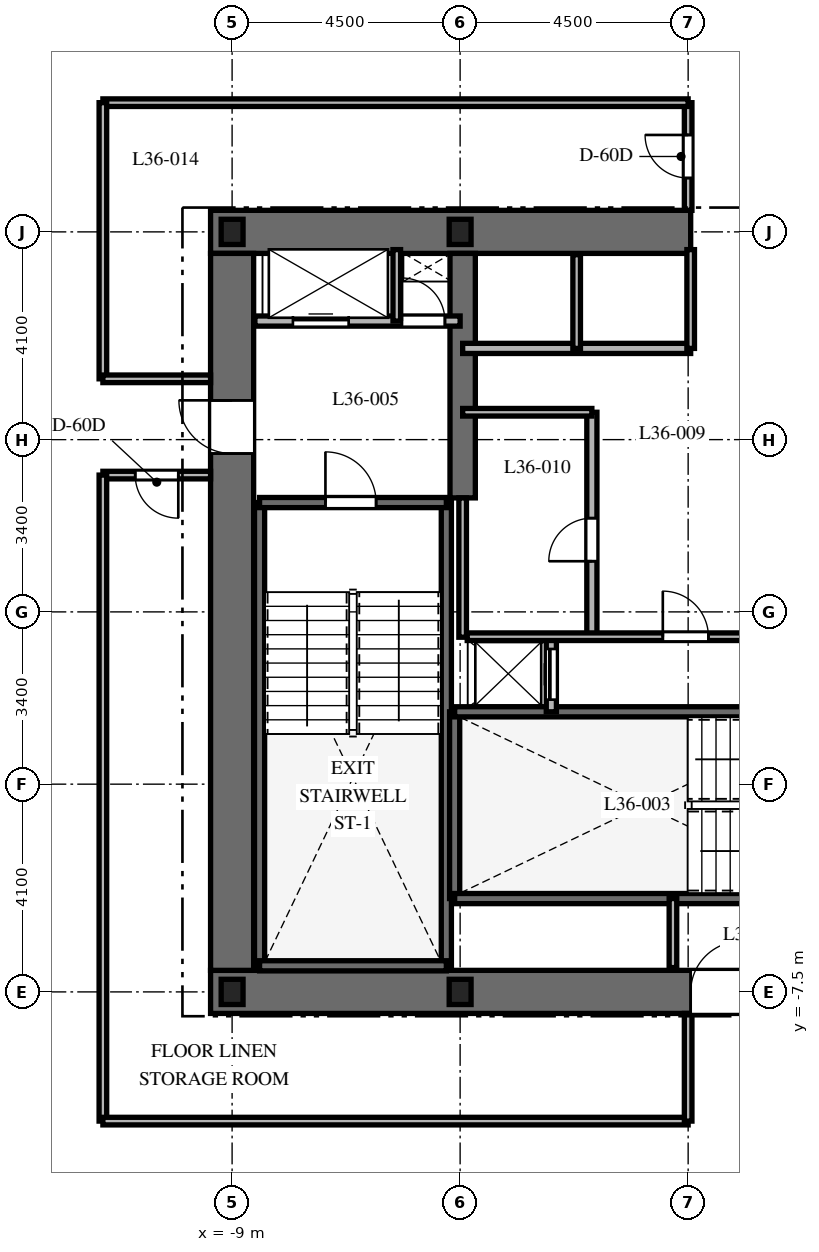
"""IFC4 building model, lengths in metres.
Left out: names, types, materials, properties, quantities, classifications, styles, units other than length and angle.
Written with IfcOpenShell. Run it as: python <this file> out.ifc"""

import sys

from ifc_helpers import new_model, si_unit, direction, frame, frame_2d, origin, origin_2d, place, context, subcontext, project, spatial, rectangle, i_section, extrude, element, fill, save


model = new_model("IFC4")
c1 = context("Model", 3, precision=1e-05, world=origin(), true_north=direction((0.0, 1.0)))
c2 = subcontext(c1, "Body", "Model", "MODEL_VIEW")
j1 = project(units=[si_unit("LENGTHUNIT", "METRE"), si_unit("PLANEANGLEUNIT", "RADIAN")], contexts=[c1])
p1 = place(None, origin())
s1 = spatial("IfcSite", under=j1, at=p1, CompositionType="ELEMENT")
p2 = place(p1, origin())
s2 = spatial("IfcBuilding", under=s1, at=p2, CompositionType="ELEMENT")
p3 = place(p2, frame((0.0, 0.0, 148.0)))
s3 = spatial("IfcBuildingStorey", under=s2, at=p3, CompositionType="ELEMENT", Elevation=148.0)
p4 = place(p3, frame((-9.425, -7.5, 0.0), z_axis=(0.0, 0.0, 1.0), x_axis=(1.0, 0.0, 0.0)))
e1 = element("IfcWall", 1, at=p4, inside=s3, PredefinedType="SHEAR", context=c2, shape_type="SweptSolid", body=[
    extrude(rectangle(XDim=18.85, YDim=0.85, at=frame_2d((9.425, 0.0))), origin(), (0.0, 0.0, 1.0), 3.7),
])
p5 = place(p4, frame((9.475, 0.0, 0.0)))
e2 = element("IfcOpeningElement", 2, at=p5, cuts=e1, PredefinedType="OPENING", context=c2, shape_type="SweptSolid", body=[
    extrude(rectangle(XDim=1.0, YDim=2.15, at=frame_2d((0.5, 1.075))), frame((0.0, 0.435, 0.0), z_axis=(0.0, -1.0, 0.0), x_axis=(1.0, 0.0, 0.0)), (0.0, 0.0, 1.0), 0.87),
])
p6 = place(p3, frame((-9.425, 7.5, 0.0), z_axis=(0.0, 0.0, 1.0), x_axis=(1.0, 0.0, 0.0)))
e3 = element("IfcWall", 3, at=p6, inside=s3, PredefinedType="SHEAR", context=c2, shape_type="SweptSolid", body=[
    extrude(rectangle(XDim=9.475, YDim=0.85, at=frame_2d((4.738, 0.0))), origin(), (0.0, 0.0, 1.0), 3.7),
])
p7 = place(p3, frame((-9.0, -7.075, 0.0), z_axis=(0.0, 0.0, 1.0), x_axis=(0.0, 1.0, 0.0)))
e4 = element("IfcWall", 4, at=p7, inside=s3, PredefinedType="SHEAR", context=c2, shape_type="SweptSolid", body=[
    extrude(rectangle(XDim=14.15, YDim=0.85, at=frame_2d((7.075, 0.0))), origin(), (0.0, 0.0, 1.0), 3.7),
])
p8 = place(p7, frame((10.2, 0.0, 0.0)))
e5 = element("IfcOpeningElement", 5, at=p8, cuts=e4, PredefinedType="OPENING", context=c2, shape_type="SweptSolid", body=[
    extrude(rectangle(XDim=1.05, YDim=2.15, at=frame_2d((0.525, 1.075))), frame((0.0, 0.435, 0.0), z_axis=(0.0, -1.0, 0.0), x_axis=(1.0, 0.0, 0.0)), (0.0, 0.0, 1.0), 0.87),
])
p9 = place(p3, frame((-4.45, 2.25, 0.0), z_axis=(0.0, 0.0, 1.0), x_axis=(0.0, 1.0, 0.0)))
e6 = element("IfcWall", 6, at=p9, inside=s3, PredefinedType="SHEAR", context=c2, shape_type="SweptSolid", body=[
    extrude(rectangle(XDim=4.825, YDim=0.5, at=frame_2d((2.413, 0.0))), origin(), (0.0, 0.0, 1.0), 3.7),
])
for number, where, z_axis, x_axis in (
    (7, (-8.458, -6.985, 0.0), (0.0, 0.0, 1.0), (0.0, 1.0, 0.0)),
    (8, (-4.772, -6.985, 0.0), (0.0, 0.0, 1.0), (0.0, 1.0, 0.0)),
):
    element("IfcWall", number, at=place(p3, frame(where, z_axis=z_axis, x_axis=x_axis)), inside=s3, PredefinedType="SHEAR", context=c2, shape_type="SweptSolid", body=[
        extrude(rectangle(XDim=9.143, YDim=0.2, at=frame_2d((4.572, 0.0))), origin(), (0.0, 0.0, 1.0), 3.7),
    ])
p10 = place(p3, frame((-8.458, -6.985, 0.0), z_axis=(0.0, 0.0, 1.0), x_axis=(1.0, 0.0, 0.0)))
e9 = element("IfcWall", 9, at=p10, inside=s3, PredefinedType="SHEAR", context=c2, shape_type="SweptSolid", body=[
    extrude(rectangle(XDim=3.686, YDim=0.2, at=frame_2d((1.843, 0.0))), origin(), (0.0, 0.0, 1.0), 3.7),
])
p11 = place(p3, frame((-8.458, 2.158, 0.0), z_axis=(0.0, 0.0, 1.0), x_axis=(1.0, 0.0, 0.0)))
e10 = element("IfcWall", 10, at=p11, inside=s3, PredefinedType="SHEAR", context=c2, shape_type="SweptSolid", body=[
    extrude(rectangle(XDim=3.686, YDim=0.2, at=frame_2d((1.843, 0.0))), origin(), (0.0, 0.0, 1.0), 3.7),
])
p12 = place(p11, frame((1.3, 0.0, 0.0)))
e11 = element("IfcOpeningElement", 11, at=p12, cuts=e10, PredefinedType="OPENING", context=c2, shape_type="SweptSolid", body=[
    extrude(rectangle(XDim=1.0, YDim=2.15, at=frame_2d((0.5, 1.075))), frame((0.0, 0.11, 0.0), z_axis=(0.0, -1.0, 0.0), x_axis=(1.0, 0.0, 0.0)), (0.0, 0.0, 1.0), 0.22),
])
p13 = place(p3, frame((-4.608, -5.658, 0.0), z_axis=(0.0, 0.0, 1.0), x_axis=(0.0, 1.0, 0.0)))
e12 = element("IfcWall", 12, at=p13, inside=s3, PredefinedType="SHEAR", context=c2, shape_type="SweptSolid", body=[
    extrude(rectangle(XDim=3.686, YDim=0.2, at=frame_2d((1.843, 0.0))), origin(), (0.0, 0.0, 1.0), 3.7),
])
p14 = place(p3, frame((-4.608, -5.658, 0.0), z_axis=(0.0, 0.0, 1.0), x_axis=(1.0, 0.0, 0.0)))
e13 = element("IfcWall", 13, at=p14, inside=s3, PredefinedType="SHEAR", context=c2, shape_type="SweptSolid", body=[
    extrude(rectangle(XDim=9.166, YDim=0.2, at=frame_2d((4.583, 0.0))), origin(), (0.0, 0.0, 1.0), 3.7),
])
p15 = place(p14, frame((7.45, 0.0, 0.0)))
e14 = element("IfcOpeningElement", 14, at=p15, cuts=e13, PredefinedType="OPENING", context=c2, shape_type="SweptSolid", body=[
    extrude(rectangle(XDim=1.0, YDim=2.15, at=frame_2d((0.5, 1.075))), frame((0.0, 0.11, 0.0), z_axis=(0.0, -1.0, 0.0), x_axis=(1.0, 0.0, 0.0)), (0.0, 0.0, 1.0), 0.22),
])
p16 = place(p3, frame((-4.608, -1.972, 0.0), z_axis=(0.0, 0.0, 1.0), x_axis=(1.0, 0.0, 0.0)))
e15 = element("IfcWall", 15, at=p16, inside=s3, PredefinedType="SHEAR", context=c2, shape_type="SweptSolid", body=[
    extrude(rectangle(XDim=9.166, YDim=0.2, at=frame_2d((4.583, 0.0))), origin(), (0.0, 0.0, 1.0), 3.7),
])
for number, where, z_axis, x_axis in (
    (16, (-9.0, -7.5, 0.0), (0.0, 0.0, 1.0), (1.0, 0.0, 0.0)),
    (17, (-4.5, -7.5, 0.0), (0.0, 0.0, 1.0), (1.0, 0.0, 0.0)),
    (18, (-4.5, 7.5, 0.0), (0.0, 0.0, 1.0), (1.0, 0.0, 0.0)),
    (19, (-9.0, 7.5, 0.0), (0.0, 0.0, 1.0), (1.0, 0.0, 0.0)),
):
    element("IfcColumn", number, at=place(p3, frame(where, z_axis=z_axis, x_axis=x_axis)), inside=s3, PredefinedType="COLUMN", context=c2, shape_type="SweptSolid", body=[
        extrude(i_section(OverallWidth=0.432, OverallDepth=0.498, WebThickness=0.056, FlangeThickness=0.089, at=origin_2d()), origin(), (0.0, 0.0, 1.0), 3.7),
    ])
p17 = place(p3, frame((-0.3, -7.02, 0.0), z_axis=(0.0, 0.0, 1.0), x_axis=(0.0, 1.0, 0.0)))
e20 = element("IfcWall", 20, at=p17, inside=s3, PredefinedType="PARTITIONING", context=c2, shape_type="SweptSolid", body=[
    extrude(rectangle(XDim=1.362, YDim=0.15, at=frame_2d((0.681, 0.0))), origin(), (0.0, 0.0, 1.0), 3.4),
])
p18 = place(p3, frame((-8.55, 5.74, 0.0), z_axis=(0.0, 0.0, 1.0), x_axis=(1.0, 0.0, 0.0)))
e21 = element("IfcWall", 21, at=p18, inside=s3, PredefinedType="PARTITIONING", context=c2, shape_type="SweptSolid", body=[
    extrude(rectangle(XDim=4.05, YDim=0.2, at=frame_2d((2.025, 0.0))), origin(), (0.0, 0.0, 1.0), 3.4),
])
p19 = place(p18, frame((0.75, 0.0, 0.0)))
e22 = element("IfcOpeningElement", 22, at=p19, cuts=e21, PredefinedType="OPENING", context=c2, shape_type="SweptSolid", body=[
    extrude(rectangle(XDim=1.1, YDim=2.2, at=frame_2d((0.55, 1.1))), frame((0.0, 0.11, 0.0), z_axis=(0.0, -1.0, 0.0), x_axis=(1.0, 0.0, 0.0)), (0.0, 0.0, 1.0), 0.22),
])
p20 = place(p18, frame((2.9, 0.0, 0.0)))
e23 = element("IfcOpeningElement", 23, at=p20, cuts=e21, PredefinedType="OPENING", context=c2, shape_type="SweptSolid", body=[
    extrude(rectangle(XDim=0.85, YDim=2.03, at=frame_2d((0.425, 1.015))), frame((0.0, 0.11, 0.0), z_axis=(0.0, -1.0, 0.0), x_axis=(1.0, 0.0, 0.0)), (0.0, 0.0, 1.0), 0.22),
])
p21 = place(p3, frame((-5.75, 5.74, 0.0), z_axis=(0.0, 0.0, 1.0), x_axis=(0.0, 1.0, 0.0)))
e24 = element("IfcWall", 24, at=p21, inside=s3, PredefinedType="PARTITIONING", context=c2, shape_type="SweptSolid", body=[
    extrude(rectangle(XDim=1.41, YDim=0.15, at=frame_2d((0.705, 0.0))), origin(), (0.0, 0.0, 1.0), 3.4),
])
p22 = place(p3, frame((-2.7, -1.972, 0.0), z_axis=(0.0, 0.0, 1.0), x_axis=(0.0, 1.0, 0.0)))
e25 = element("IfcWall", 25, at=p22, inside=s3, PredefinedType="PARTITIONING", context=c2, shape_type="SweptSolid", body=[
    extrude(rectangle(XDim=1.472, YDim=0.2, at=frame_2d((0.736, 0.0))), origin(), (0.0, 0.0, 1.0), 3.4),
])
p23 = place(p22, frame((0.24, 0.0, 0.0)))
e26 = element("IfcOpeningElement", 26, at=p23, cuts=e25, PredefinedType="OPENING", context=c2, shape_type="SweptSolid", body=[
    extrude(rectangle(XDim=1.0, YDim=2.2, at=frame_2d((0.5, 1.1))), frame((0.0, 0.11, 0.0), z_axis=(0.0, -1.0, 0.0), x_axis=(1.0, 0.0, 0.0)), (0.0, 0.0, 1.0), 0.22),
])
p24 = place(p3, frame((-4.45, 5.2, 0.0), z_axis=(0.0, 0.0, 1.0), x_axis=(1.0, 0.0, 0.0)))
e27 = element("IfcWall", 27, at=p24, inside=s3, PredefinedType="PARTITIONING", context=c2, shape_type="SweptSolid", body=[
    extrude(rectangle(XDim=4.5, YDim=0.2, at=frame_2d((2.25, 0.0))), origin(), (0.0, 0.0, 1.0), 3.4),
])
p25 = place(p3, frame((-2.2, 5.2, 0.0), z_axis=(0.0, 0.0, 1.0), x_axis=(0.0, 1.0, 0.0)))
e28 = element("IfcWall", 28, at=p25, inside=s3, PredefinedType="PARTITIONING", context=c2, shape_type="SweptSolid", body=[
    extrude(rectangle(XDim=1.85, YDim=0.15, at=frame_2d((0.925, 0.0))), origin(), (0.0, 0.0, 1.0), 3.4),
])
p26 = place(p3, frame((0.05, 5.2, 0.0), z_axis=(0.0, 0.0, 1.0), x_axis=(0.0, 1.0, 0.0)))
e29 = element("IfcWall", 29, at=p26, inside=s3, PredefinedType="PARTITIONING", context=c2, shape_type="SweptSolid", body=[
    extrude(rectangle(XDim=1.95, YDim=0.15, at=frame_2d((0.975, 0.0))), origin(), (0.0, 0.0, 1.0), 3.4),
])
p27 = place(p3, frame((-4.45, -0.5, 0.0), z_axis=(0.0, 0.0, 1.0), x_axis=(0.0, 1.0, 0.0)))
e30 = element("IfcWall", 30, at=p27, inside=s3, PredefinedType="PARTITIONING", context=c2, shape_type="SweptSolid", body=[
    extrude(rectangle(XDim=2.75, YDim=0.15, at=frame_2d((1.375, 0.0))), origin(), (0.0, 0.0, 1.0), 3.4),
])
p28 = place(p3, frame((-1.9, -0.5, 0.0), z_axis=(0.0, 0.0, 1.0), x_axis=(0.0, 1.0, 0.0)))
e31 = element("IfcWall", 31, at=p28, inside=s3, PredefinedType="PARTITIONING", context=c2, shape_type="SweptSolid", body=[
    extrude(rectangle(XDim=4.44, YDim=0.2, at=frame_2d((2.22, 0.0))), origin(), (0.0, 0.0, 1.0), 3.4),
])
p29 = place(p28, frame((1.5, 0.0, 0.0)))
e32 = element("IfcOpeningElement", 32, at=p29, cuts=e31, PredefinedType="OPENING", context=c2, shape_type="SweptSolid", body=[
    extrude(rectangle(XDim=0.85, YDim=2.03, at=frame_2d((0.425, 1.015))), frame((0.0, 0.11, 0.0), z_axis=(0.0, -1.0, 0.0), x_axis=(1.0, 0.0, 0.0)), (0.0, 0.0, 1.0), 0.22),
])
p30 = place(p3, frame((-4.45, 3.94, 0.0), z_axis=(0.0, 0.0, 1.0), x_axis=(1.0, 0.0, 0.0)))
e33 = element("IfcWall", 33, at=p30, inside=s3, PredefinedType="PARTITIONING", context=c2, shape_type="SweptSolid", body=[
    extrude(rectangle(XDim=2.55, YDim=0.15, at=frame_2d((1.275, 0.0))), origin(), (0.0, 0.0, 1.0), 3.4),
])
p31 = place(p3, frame((-4.36, -0.49, 0.0), z_axis=(0.0, 0.0, 1.0), x_axis=(1.0, 0.0, 0.0)))
e34 = element("IfcWall", 34, at=p31, inside=s3, PredefinedType="PARTITIONING", context=c2, shape_type="SweptSolid", body=[
    extrude(rectangle(XDim=8.72, YDim=0.15, at=frame_2d((4.36, 0.0))), origin(), (0.0, 0.0, 1.0), 3.4),
])
p32 = place(p31, frame((3.86, 0.0, 0.0)))
e35 = element("IfcOpeningElement", 35, at=p32, cuts=e34, PredefinedType="OPENING", context=c2, shape_type="SweptSolid", body=[
    extrude(rectangle(XDim=0.9, YDim=2.03, at=frame_2d((0.45, 1.015))), frame((0.0, 0.085, 0.0), z_axis=(0.0, -1.0, 0.0), x_axis=(1.0, 0.0, 0.0)), (0.0, 0.0, 1.0), 0.17),
])
p33 = place(p3, frame((0.0, 7.925, 0.0), z_axis=(0.0, 0.0, 1.0), x_axis=(0.0, 1.0, 0.0)))
e36 = element("IfcWall", 36, at=p33, inside=s3, PredefinedType="PARTITIONING", context=c2, shape_type="SweptSolid", body=[
    extrude(rectangle(XDim=2.125, YDim=0.15, at=frame_2d((1.062, 0.0))), origin(), (0.0, 0.0, 1.0), 3.4),
])
p34 = place(p33, frame((0.638, 0.0, 0.0)))
e37 = element("IfcOpeningElement", 37, at=p34, cuts=e36, PredefinedType="OPENING", context=c2, shape_type="SweptSolid", body=[
    extrude(rectangle(XDim=0.85, YDim=2.03, at=frame_2d((0.425, 1.015))), frame((0.0, 0.085, 0.0), z_axis=(0.0, -1.0, 0.0), x_axis=(1.0, 0.0, 0.0)), (0.0, 0.0, 1.0), 0.17),
])
p35 = place(p3, frame((0.0, 10.05, 0.0), z_axis=(0.0, 0.0, 1.0), x_axis=(-1.0, 0.0, 0.0)))
e38 = element("IfcWall", 38, at=p35, inside=s3, PredefinedType="PARTITIONING", context=c2, shape_type="SweptSolid", body=[
    extrude(rectangle(XDim=11.55, YDim=0.15, at=frame_2d((5.775, 0.0))), origin(), (0.0, 0.0, 1.0), 2.84),
])
p36 = place(p3, frame((-11.55, 10.05, 0.0), z_axis=(0.0, 0.0, 1.0), x_axis=(0.0, -1.0, 0.0)))
e39 = element("IfcWall", 39, at=p36, inside=s3, PredefinedType="PARTITIONING", context=c2, shape_type="SweptSolid", body=[
    extrude(rectangle(XDim=5.45, YDim=0.15, at=frame_2d((2.725, 0.0))), origin(), (0.0, 0.0, 1.0), 2.84),
])
p37 = place(p3, frame((-11.55, 4.6, 0.0), z_axis=(0.0, 0.0, 1.0), x_axis=(1.0, 0.0, 0.0)))
e40 = element("IfcWall", 40, at=p37, inside=s3, PredefinedType="PARTITIONING", context=c2, shape_type="SweptSolid", body=[
    extrude(rectangle(XDim=2.125, YDim=0.15, at=frame_2d((1.062, 0.0))), origin(), (0.0, 0.0, 1.0), 3.4),
])
p38 = place(p3, frame((-9.425, 2.7, 0.0), z_axis=(0.0, 0.0, 1.0), x_axis=(-1.0, 0.0, 0.0)))
e41 = element("IfcWall", 41, at=p38, inside=s3, PredefinedType="PARTITIONING", context=c2, shape_type="SweptSolid", body=[
    extrude(rectangle(XDim=2.125, YDim=0.15, at=frame_2d((1.062, 0.0))), origin(), (0.0, 0.0, 1.0), 3.4),
])
p39 = place(p38, frame((0.637, 0.0, 0.0)))
e42 = element("IfcOpeningElement", 42, at=p39, cuts=e41, PredefinedType="OPENING", context=c2, shape_type="SweptSolid", body=[
    extrude(rectangle(XDim=0.85, YDim=2.03, at=frame_2d((0.425, 1.015))), frame((0.0, 0.085, 0.0), z_axis=(0.0, -1.0, 0.0), x_axis=(1.0, 0.0, 0.0)), (0.0, 0.0, 1.0), 0.17),
])
p40 = place(p3, frame((-11.55, 2.7, 0.0), z_axis=(0.0, 0.0, 1.0), x_axis=(0.0, -1.0, 0.0)))
e43 = element("IfcWall", 43, at=p40, inside=s3, PredefinedType="PARTITIONING", context=c2, shape_type="SweptSolid", body=[
    extrude(rectangle(XDim=12.75, YDim=0.15, at=frame_2d((6.375, 0.0))), origin(), (0.0, 0.0, 1.0), 2.84),
])
p41 = place(p3, frame((-11.55, -10.05, 0.0), z_axis=(0.0, 0.0, 1.0), x_axis=(1.0, 0.0, 0.0)))
e44 = element("IfcWall", 44, at=p41, inside=s3, PredefinedType="PARTITIONING", context=c2, shape_type="SweptSolid", body=[
    extrude(rectangle(XDim=11.55, YDim=0.15, at=frame_2d((5.775, 0.0))), origin(), (0.0, 0.0, 1.0), 2.84),
])
p42 = place(p3, frame((0.0, -10.05, 0.0), z_axis=(0.0, 0.0, 1.0), x_axis=(0.0, 1.0, 0.0)))
e45 = element("IfcWall", 45, at=p42, inside=s3, PredefinedType="PARTITIONING", context=c2, shape_type="SweptSolid", body=[
    extrude(rectangle(XDim=2.125, YDim=0.15, at=frame_2d((1.062, 0.0))), origin(), (0.0, 0.0, 1.0), 3.4),
])
p43 = place(p12, origin())
e46 = element("IfcDoor", 46, at=p43, inside=s3, OperationType="SINGLE_SWING_LEFT", PredefinedType="DOOR", context=c2, shape_type="SweptSolid", body=[
    extrude(rectangle(XDim=1.0, YDim=2.15, at=frame_2d((0.5, 1.075))), frame((0.0, 0.025, 0.0), z_axis=(0.0, -1.0, 0.0), x_axis=(1.0, 0.0, 0.0)), (0.0, 0.0, 1.0), 0.05),
])
fill(e11, e46)
p44 = place(p5, origin())
e47 = element("IfcDoor", 47, at=p44, inside=s3, OperationType="SINGLE_SWING_RIGHT", PredefinedType="DOOR", context=c2, shape_type="SweptSolid", body=[
    extrude(rectangle(XDim=1.0, YDim=2.15, at=frame_2d((0.5, 1.075))), frame((0.0, 0.025, 0.0), z_axis=(0.0, -1.0, 0.0), x_axis=(1.0, 0.0, 0.0)), (0.0, 0.0, 1.0), 0.05),
])
fill(e2, e47)
p45 = place(p8, origin())
e48 = element("IfcDoor", 48, at=p45, inside=s3, OperationType="SINGLE_SWING_RIGHT", PredefinedType="DOOR", context=c2, shape_type="SweptSolid", body=[
    extrude(rectangle(XDim=1.05, YDim=2.15, at=frame_2d((0.525, 1.075))), frame((0.0, 0.025, 0.0), z_axis=(0.0, -1.0, 0.0), x_axis=(1.0, 0.0, 0.0)), (0.0, 0.0, 1.0), 0.05),
])
fill(e5, e48)
p46 = place(p19, origin())
e49 = element("IfcDoor", 49, at=p46, inside=s3, OperationType="SLIDING_TO_LEFT", PredefinedType="DOOR", context=c2, shape_type="SweptSolid", body=[
    extrude(rectangle(XDim=1.1, YDim=2.2, at=frame_2d((0.55, 1.1))), frame((0.0, 0.025, 0.0), z_axis=(0.0, -1.0, 0.0), x_axis=(1.0, 0.0, 0.0)), (0.0, 0.0, 1.0), 0.05),
])
fill(e22, e49)
p47 = place(p20, origin())
e50 = element("IfcDoor", 50, at=p47, inside=s3, OperationType="SINGLE_SWING_LEFT", PredefinedType="DOOR", context=c2, shape_type="SweptSolid", body=[
    extrude(rectangle(XDim=0.85, YDim=2.03, at=frame_2d((0.425, 1.015))), frame((0.0, 0.025, 0.0), z_axis=(0.0, -1.0, 0.0), x_axis=(1.0, 0.0, 0.0)), (0.0, 0.0, 1.0), 0.05),
])
fill(e23, e50)
p48 = place(p23, origin())
e51 = element("IfcDoor", 51, at=p48, inside=s3, OperationType="SLIDING_TO_LEFT", PredefinedType="DOOR", context=c2, shape_type="SweptSolid", body=[
    extrude(rectangle(XDim=1.0, YDim=2.2, at=frame_2d((0.5, 1.1))), frame((0.0, 0.025, 0.0), z_axis=(0.0, -1.0, 0.0), x_axis=(1.0, 0.0, 0.0)), (0.0, 0.0, 1.0), 0.05),
])
fill(e26, e51)
p49 = place(p29, origin())
e52 = element("IfcDoor", 52, at=p49, inside=s3, OperationType="SINGLE_SWING_LEFT", PredefinedType="DOOR", context=c2, shape_type="SweptSolid", body=[
    extrude(rectangle(XDim=0.85, YDim=2.03, at=frame_2d((0.425, 1.015))), frame((0.0, 0.025, 0.0), z_axis=(0.0, -1.0, 0.0), x_axis=(1.0, 0.0, 0.0)), (0.0, 0.0, 1.0), 0.05),
])
fill(e32, e52)
p50 = place(p32, origin())
e53 = element("IfcDoor", 53, at=p50, inside=s3, OperationType="SINGLE_SWING_LEFT", PredefinedType="DOOR", context=c2, shape_type="SweptSolid", body=[
    extrude(rectangle(XDim=0.9, YDim=2.03, at=frame_2d((0.45, 1.015))), frame((0.0, 0.025, 0.0), z_axis=(0.0, -1.0, 0.0), x_axis=(1.0, 0.0, 0.0)), (0.0, 0.0, 1.0), 0.05),
])
fill(e35, e53)
p51 = place(p39, origin())
e54 = element("IfcDoor", 54, at=p51, inside=s3, OperationType="SINGLE_SWING_LEFT", PredefinedType="DOOR", context=c2, shape_type="SweptSolid", body=[
    extrude(rectangle(XDim=0.85, YDim=2.03, at=frame_2d((0.425, 1.015))), frame((0.0, 0.025, 0.0), z_axis=(0.0, -1.0, 0.0), x_axis=(1.0, 0.0, 0.0)), (0.0, 0.0, 1.0), 0.05),
])
fill(e42, e54)
p52 = place(p34, origin())
e55 = element("IfcDoor", 55, at=p52, inside=s3, OperationType="SINGLE_SWING_RIGHT", PredefinedType="DOOR", context=c2, shape_type="SweptSolid", body=[
    extrude(rectangle(XDim=0.85, YDim=2.03, at=frame_2d((0.425, 1.015))), frame((0.0, 0.025, 0.0), z_axis=(0.0, -1.0, 0.0), x_axis=(1.0, 0.0, 0.0)), (0.0, 0.0, 1.0), 0.05),
])
fill(e37, e55)
save(model, sys.argv[1])
